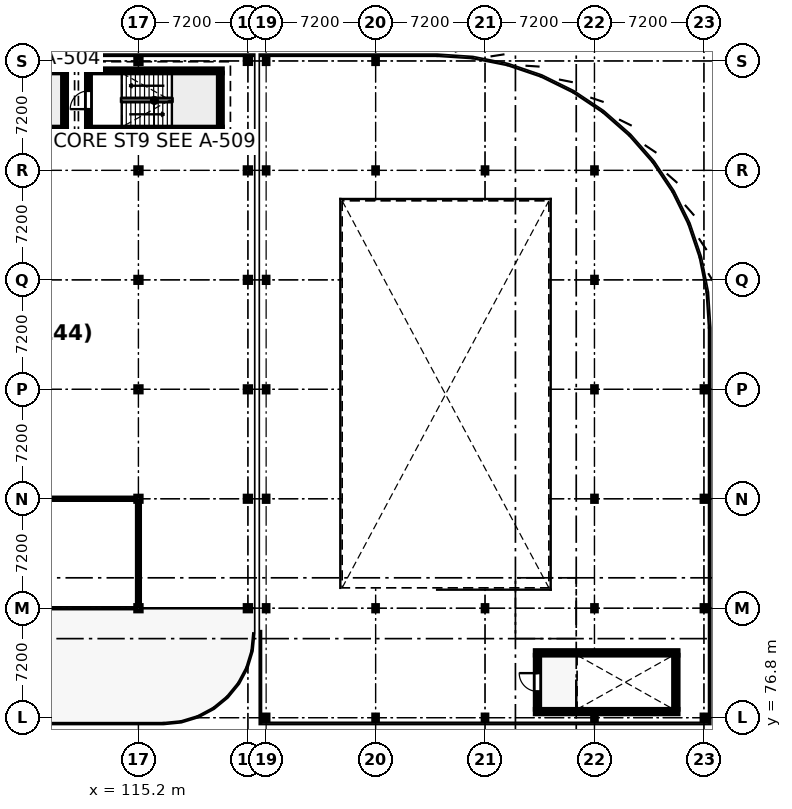
"""IFC4 building model, lengths in metres.
Left out: names, types, materials, properties, quantities, classifications, styles, units other than length and angle.
Written with IfcOpenShell. Run it as: python <this file> out.ifc"""

import sys

from ifc_helpers import new_model, si_unit, direction, frame, frame_2d, origin, origin_2d, place, context, subcontext, project, spatial, rectangle, i_section, extrude, element, fill, save


model = new_model("IFC4")
c1 = context("Model", 3, precision=1e-05, world=origin(), true_north=direction((0.0, 1.0)))
c2 = subcontext(c1, "Body", "Model", "MODEL_VIEW")
j1 = project(units=[si_unit("LENGTHUNIT", "METRE"), si_unit("PLANEANGLEUNIT", "RADIAN")], contexts=[c1])
p1 = place(None, origin())
s1 = spatial("IfcSite", under=j1, at=p1, CompositionType="ELEMENT")
p2 = place(p1, origin())
s2 = spatial("IfcBuilding", under=s1, at=p2, CompositionType="ELEMENT")
p3 = place(p2, frame((0.0, 0.0, 17.1)))
s3 = spatial("IfcBuildingStorey", under=s2, at=p3, CompositionType="ELEMENT", Elevation=17.1)
p4 = place(p3, frame((123.6, 76.8, 0.0), z_axis=(0.0, 0.0, 1.0), x_axis=(1.0, 0.0, 0.0)))
e1 = element("IfcColumn", 1, at=p4, inside=s3, PredefinedType="COLUMN", context=c2, shape_type="SweptSolid", body=[
    extrude(i_section(OverallWidth=0.257, OverallDepth=0.363, WebThickness=0.013, FlangeThickness=0.022, FilletRadius=0.015, at=origin_2d()), origin(), (0.0, 0.0, 1.0), 4.944),
])
for number, where, z_axis, x_axis in (
    (2, (123.6, 84.0, 0.0), (0.0, 0.0, 1.0), (1.0, 0.0, 0.0)),
    (3, (123.6, 91.2, 0.0), (0.0, 0.0, 1.0), (1.0, 0.0, 0.0)),
    (4, (123.6, 98.4, 0.0), (0.0, 0.0, 1.0), (1.0, 0.0, 0.0)),
    (5, (123.6, 105.6, 0.0), (0.0, 0.0, 1.0), (1.0, 0.0, 0.0)),
    (6, (123.6, 112.8, 0.0), (0.0, 0.0, 1.0), (1.0, 0.0, 0.0)),
):
    element("IfcColumn", number, at=place(p3, frame(where, z_axis=z_axis, x_axis=x_axis)), inside=s3, PredefinedType="COLUMN", context=c2, shape_type="SweptSolid", body=[
        extrude(i_section(OverallWidth=0.257, OverallDepth=0.363, WebThickness=0.013, FlangeThickness=0.022, FilletRadius=0.015, at=origin_2d()), origin(), (0.0, 0.0, 1.0), 4.15),
    ])
for number, where, z_axis, x_axis in (
    (7, (123.6, 120.0, 0.0), (0.0, 0.0, 1.0), (1.0, 0.0, 0.0)),
    (8, (130.8, 76.8, 0.0), (0.0, 0.0, 1.0), (1.0, 0.0, 0.0)),
):
    element("IfcColumn", number, at=place(p3, frame(where, z_axis=z_axis, x_axis=x_axis)), inside=s3, PredefinedType="COLUMN", context=c2, shape_type="SweptSolid", body=[
        extrude(i_section(OverallWidth=0.257, OverallDepth=0.363, WebThickness=0.013, FlangeThickness=0.022, FilletRadius=0.015, at=origin_2d()), origin(), (0.0, 0.0, 1.0), 4.944),
    ])
for number, where, z_axis, x_axis in (
    (9, (130.8, 84.0, 0.0), (0.0, 0.0, 1.0), (1.0, 0.0, 0.0)),
    (10, (130.8, 112.8, 0.0), (0.0, 0.0, 1.0), (1.0, 0.0, 0.0)),
):
    element("IfcColumn", number, at=place(p3, frame(where, z_axis=z_axis, x_axis=x_axis)), inside=s3, PredefinedType="COLUMN", context=c2, shape_type="SweptSolid", body=[
        extrude(i_section(OverallWidth=0.257, OverallDepth=0.363, WebThickness=0.013, FlangeThickness=0.022, FilletRadius=0.015, at=origin_2d()), origin(), (0.0, 0.0, 1.0), 4.15),
    ])
for number, where, z_axis, x_axis in (
    (11, (130.8, 120.0, 0.0), (0.0, 0.0, 1.0), (1.0, 0.0, 0.0)),
    (12, (138.0, 76.8, 0.0), (0.0, 0.0, 1.0), (1.0, 0.0, 0.0)),
):
    element("IfcColumn", number, at=place(p3, frame(where, z_axis=z_axis, x_axis=x_axis)), inside=s3, PredefinedType="COLUMN", context=c2, shape_type="SweptSolid", body=[
        extrude(i_section(OverallWidth=0.257, OverallDepth=0.363, WebThickness=0.013, FlangeThickness=0.022, FilletRadius=0.015, at=origin_2d()), origin(), (0.0, 0.0, 1.0), 4.944),
    ])
p5 = place(p3, frame((138.0, 84.0, 0.0), z_axis=(0.0, 0.0, 1.0), x_axis=(1.0, 0.0, 0.0)))
e13 = element("IfcColumn", 13, at=p5, inside=s3, PredefinedType="COLUMN", context=c2, shape_type="SweptSolid", body=[
    extrude(i_section(OverallWidth=0.257, OverallDepth=0.363, WebThickness=0.013, FlangeThickness=0.022, FilletRadius=0.015, at=origin_2d()), origin(), (0.0, 0.0, 1.0), 4.15),
])
p6 = place(p3, frame((138.0, 112.8, 0.0), z_axis=(0.0, 0.0, 1.0), x_axis=(1.0, 0.0, 0.0)))
e14 = element("IfcColumn", 14, at=p6, inside=s3, PredefinedType="COLUMN", context=c2, shape_type="SweptSolid", body=[
    extrude(i_section(OverallWidth=0.257, OverallDepth=0.363, WebThickness=0.013, FlangeThickness=0.022, FilletRadius=0.015, at=origin_2d()), origin(), (0.0, 0.0, 1.0), 6.096),
])
p7 = place(p3, frame((145.2, 76.8, 0.0), z_axis=(0.0, 0.0, 1.0), x_axis=(1.0, 0.0, 0.0)))
e15 = element("IfcColumn", 15, at=p7, inside=s3, PredefinedType="COLUMN", context=c2, shape_type="SweptSolid", body=[
    extrude(i_section(OverallWidth=0.257, OverallDepth=0.363, WebThickness=0.013, FlangeThickness=0.022, FilletRadius=0.015, at=origin_2d()), origin(), (0.0, 0.0, 1.0), 4.944),
])
for number, where, z_axis, x_axis in (
    (16, (145.2, 84.0, 0.0), (0.0, 0.0, 1.0), (1.0, 0.0, 0.0)),
    (17, (145.2, 91.2, 0.0), (0.0, 0.0, 1.0), (1.0, 0.0, 0.0)),
    (18, (145.2, 98.4, 0.0), (0.0, 0.0, 1.0), (1.0, 0.0, 0.0)),
    (19, (145.2, 105.6, 0.0), (0.0, 0.0, 1.0), (1.0, 0.0, 0.0)),
):
    element("IfcColumn", number, at=place(p3, frame(where, z_axis=z_axis, x_axis=x_axis)), inside=s3, PredefinedType="COLUMN", context=c2, shape_type="SweptSolid", body=[
        extrude(i_section(OverallWidth=0.257, OverallDepth=0.363, WebThickness=0.013, FlangeThickness=0.022, FilletRadius=0.015, at=origin_2d()), origin(), (0.0, 0.0, 1.0), 4.15),
    ])
p8 = place(p3, frame((145.2, 112.8, 0.0), z_axis=(0.0, 0.0, 1.0), x_axis=(1.0, 0.0, 0.0)))
e20 = element("IfcColumn", 20, at=p8, inside=s3, PredefinedType="COLUMN", context=c2, shape_type="SweptSolid", body=[
    extrude(i_section(OverallWidth=0.257, OverallDepth=0.363, WebThickness=0.013, FlangeThickness=0.022, FilletRadius=0.015, at=origin_2d()), origin(), (0.0, 0.0, 1.0), 6.096),
])
p9 = place(p3, frame((152.4, 76.8, 0.0), z_axis=(0.0, 0.0, 1.0), x_axis=(1.0, 0.0, 0.0)))
e21 = element("IfcColumn", 21, at=p9, inside=s3, PredefinedType="COLUMN", context=c2, shape_type="SweptSolid", body=[
    extrude(i_section(OverallWidth=0.257, OverallDepth=0.363, WebThickness=0.013, FlangeThickness=0.022, FilletRadius=0.015, at=origin_2d()), origin(), (0.0, 0.0, 1.0), 4.944),
])
for number, where, z_axis, x_axis in (
    (22, (152.4, 84.0, 0.0), (0.0, 0.0, 1.0), (1.0, 0.0, 0.0)),
    (23, (152.4, 91.2, 0.0), (0.0, 0.0, 1.0), (1.0, 0.0, 0.0)),
):
    element("IfcColumn", number, at=place(p3, frame(where, z_axis=z_axis, x_axis=x_axis)), inside=s3, PredefinedType="COLUMN", context=c2, shape_type="SweptSolid", body=[
        extrude(i_section(OverallWidth=0.257, OverallDepth=0.363, WebThickness=0.013, FlangeThickness=0.022, FilletRadius=0.015, at=origin_2d()), origin(), (0.0, 0.0, 1.0), 4.15),
    ])
p10 = place(p3, frame((152.4, 98.4, 0.0), z_axis=(0.0, 0.0, 1.0), x_axis=(1.0, 0.0, 0.0)))
e24 = element("IfcColumn", 24, at=p10, inside=s3, PredefinedType="COLUMN", context=c2, shape_type="SweptSolid", body=[
    extrude(i_section(OverallWidth=0.257, OverallDepth=0.363, WebThickness=0.013, FlangeThickness=0.022, FilletRadius=0.015, at=origin_2d()), origin(), (0.0, 0.0, 1.0), 8.4),
])
p11 = place(p3, frame((115.2, 84.0, 0.0), z_axis=(0.0, 0.0, 1.0), x_axis=(1.0, 0.0, 0.0)))
e25 = element("IfcColumn", 25, at=p11, inside=s3, PredefinedType="COLUMN", context=c2, shape_type="SweptSolid", body=[
    extrude(i_section(OverallWidth=0.371, OverallDepth=0.363, WebThickness=0.013, FlangeThickness=0.022, FilletRadius=0.015, at=origin_2d()), origin(), (0.0, 0.0, 1.0), 3.9),
])
for number, where, z_axis, x_axis in (
    (26, (115.2, 91.2, 0.0), (0.0, 0.0, 1.0), (1.0, 0.0, 0.0)),
    (27, (115.2, 98.4, 0.0), (0.0, 0.0, 1.0), (1.0, 0.0, 0.0)),
    (28, (115.2, 105.6, 0.0), (0.0, 0.0, 1.0), (1.0, 0.0, 0.0)),
):
    element("IfcColumn", number, at=place(p3, frame(where, z_axis=z_axis, x_axis=x_axis)), inside=s3, PredefinedType="COLUMN", context=c2, shape_type="SweptSolid", body=[
        extrude(i_section(OverallWidth=0.368, OverallDepth=0.356, WebThickness=0.011, FlangeThickness=0.018, FilletRadius=0.015, at=origin_2d()), origin(), (0.0, 0.0, 1.0), 3.9),
    ])
p12 = place(p3, frame((115.2, 112.8, 0.0), z_axis=(0.0, 0.0, 1.0), x_axis=(1.0, 0.0, 0.0)))
e29 = element("IfcColumn", 29, at=p12, inside=s3, PredefinedType="COLUMN", context=c2, shape_type="SweptSolid", body=[
    extrude(i_section(OverallWidth=0.371, OverallDepth=0.363, WebThickness=0.013, FlangeThickness=0.022, FilletRadius=0.015, at=origin_2d()), origin(), (0.0, 0.0, 1.0), 3.9),
])
p13 = place(p3, frame((115.2, 120.0, 0.0), z_axis=(0.0, 0.0, 1.0), x_axis=(1.0, 0.0, 0.0)))
e30 = element("IfcColumn", 30, at=p13, inside=s3, PredefinedType="COLUMN", context=c2, shape_type="SweptSolid", body=[
    extrude(i_section(OverallWidth=0.368, OverallDepth=0.356, WebThickness=0.011, FlangeThickness=0.018, FilletRadius=0.015, at=origin_2d()), origin(), (0.0, 0.0, 1.0), 3.9),
])
p14 = place(p3, frame((122.4, 84.0, 0.0), z_axis=(0.0, 0.0, 1.0), x_axis=(1.0, 0.0, 0.0)))
e31 = element("IfcColumn", 31, at=p14, inside=s3, PredefinedType="COLUMN", context=c2, shape_type="SweptSolid", body=[
    extrude(i_section(OverallWidth=0.371, OverallDepth=0.363, WebThickness=0.013, FlangeThickness=0.022, FilletRadius=0.015, at=origin_2d()), origin(), (0.0, 0.0, 1.0), 3.9),
])
for number, where, z_axis, x_axis in (
    (32, (122.4, 91.2, 0.0), (0.0, 0.0, 1.0), (1.0, 0.0, 0.0)),
    (33, (122.4, 98.4, 0.0), (0.0, 0.0, 1.0), (1.0, 0.0, 0.0)),
    (34, (122.4, 105.6, 0.0), (0.0, 0.0, 1.0), (1.0, 0.0, 0.0)),
):
    element("IfcColumn", number, at=place(p3, frame(where, z_axis=z_axis, x_axis=x_axis)), inside=s3, PredefinedType="COLUMN", context=c2, shape_type="SweptSolid", body=[
        extrude(i_section(OverallWidth=0.368, OverallDepth=0.356, WebThickness=0.011, FlangeThickness=0.018, FilletRadius=0.015, at=origin_2d()), origin(), (0.0, 0.0, 1.0), 3.9),
    ])
p15 = place(p3, frame((122.4, 112.8, 0.0), z_axis=(0.0, 0.0, 1.0), x_axis=(1.0, 0.0, 0.0)))
e35 = element("IfcColumn", 35, at=p15, inside=s3, PredefinedType="COLUMN", context=c2, shape_type="SweptSolid", body=[
    extrude(i_section(OverallWidth=0.371, OverallDepth=0.363, WebThickness=0.013, FlangeThickness=0.022, FilletRadius=0.015, at=origin_2d()), origin(), (0.0, 0.0, 1.0), 3.9),
])
p16 = place(p3, frame((122.4, 120.0, 0.0), z_axis=(0.0, 0.0, 1.0), x_axis=(1.0, 0.0, 0.0)))
e36 = element("IfcColumn", 36, at=p16, inside=s3, PredefinedType="COLUMN", context=c2, shape_type="SweptSolid", body=[
    extrude(i_section(OverallWidth=0.368, OverallDepth=0.356, WebThickness=0.011, FlangeThickness=0.018, FilletRadius=0.015, at=origin_2d()), origin(), (0.0, 0.0, 1.0), 3.9),
])
for number, where, z_axis, x_axis in (
    (37, (150.7, 77.2, 0.0), (0.0, 0.0, 1.0), (-1.0, 0.0, 0.0)),
    (38, (141.3, 81.06, 0.0), (0.0, 0.0, 1.0), (1.0, 0.0, 0.0)),
):
    element("IfcWall", number, at=place(p3, frame(where, z_axis=z_axis, x_axis=x_axis)), inside=s3, PredefinedType="SOLIDWALL", context=c2, shape_type="SweptSolid", body=[
        extrude(rectangle(XDim=9.4, YDim=0.3, at=frame_2d((4.7, 0.0))), origin(), (0.0, 0.0, 1.0), 3.4),
    ])
p17 = place(p3, frame((141.45, 77.35, 0.0), z_axis=(0.0, 0.0, 1.0), x_axis=(0.0, 1.0, 0.0)))
e39 = element("IfcWall", 39, at=p17, inside=s3, PredefinedType="SOLIDWALL", context=c2, shape_type="SweptSolid", body=[
    extrude(rectangle(XDim=3.56, YDim=0.3, at=frame_2d((1.78, 0.0))), origin(), (0.0, 0.0, 1.0), 3.4),
])
p18 = place(p17, frame((1.18, 0.0, 0.0)))
e40 = element("IfcOpeningElement", 40, at=p18, cuts=e39, PredefinedType="OPENING", context=c2, shape_type="SweptSolid", body=[
    extrude(rectangle(XDim=1.2, YDim=2.2, at=frame_2d((0.6, 1.1))), frame((0.0, 0.16, 0.0), z_axis=(0.0, -1.0, 0.0), x_axis=(1.0, 0.0, 0.0)), (0.0, 0.0, 1.0), 0.32),
])
p19 = place(p3, frame((150.55, 80.91, 0.0), z_axis=(0.0, 0.0, 1.0), x_axis=(0.0, -1.0, 0.0)))
e41 = element("IfcWall", 41, at=p19, inside=s3, PredefinedType="SOLIDWALL", context=c2, shape_type="SweptSolid", body=[
    extrude(rectangle(XDim=3.56, YDim=0.3, at=frame_2d((1.78, 0.0))), origin(), (0.0, 0.0, 1.0), 3.4),
])
for number, where, z_axis, x_axis in (
    (42, (110.475, 115.512, 0.0), (0.0, 0.0, 1.0), (-1.0, 0.0, 0.0)),
    (43, (101.575, 119.348, 0.0), (0.0, 0.0, 1.0), (1.0, 0.0, 0.0)),
):
    element("IfcWall", number, at=place(p3, frame(where, z_axis=z_axis, x_axis=x_axis)), inside=s3, PredefinedType="SOLIDWALL", context=c2, shape_type="SweptSolid", body=[
        extrude(rectangle(XDim=8.9, YDim=0.275, at=frame_2d((4.45, 0.0))), origin(), (0.0, 0.0, 1.0), 3.64),
    ])
p20 = place(p3, frame((110.338, 119.21, 0.0), z_axis=(0.0, 0.0, 1.0), x_axis=(0.0, -1.0, 0.0)))
e44 = element("IfcWall", 44, at=p20, inside=s3, PredefinedType="SOLIDWALL", context=c2, shape_type="SweptSolid", body=[
    extrude(rectangle(XDim=3.56, YDim=0.275, at=frame_2d((1.78, 0.0))), origin(), (0.0, 0.0, 1.0), 3.64),
])
for number, where, z_axis, x_axis in (
    (45, (120.725, 115.512, 0.0), (0.0, 0.0, 1.0), (-1.0, 0.0, 0.0)),
    (46, (111.775, 119.348, 0.0), (0.0, 0.0, 1.0), (1.0, 0.0, 0.0)),
):
    element("IfcWall", number, at=place(p3, frame(where, z_axis=z_axis, x_axis=x_axis)), inside=s3, PredefinedType="SOLIDWALL", context=c2, shape_type="SweptSolid", body=[
        extrude(rectangle(XDim=8.95, YDim=0.275, at=frame_2d((4.475, 0.0))), origin(), (0.0, 0.0, 1.0), 3.64),
    ])
p21 = place(p3, frame((111.912, 115.65, 0.0), z_axis=(0.0, 0.0, 1.0), x_axis=(0.0, 1.0, 0.0)))
e47 = element("IfcWall", 47, at=p21, inside=s3, PredefinedType="SOLIDWALL", context=c2, shape_type="SweptSolid", body=[
    extrude(rectangle(XDim=3.56, YDim=0.275, at=frame_2d((1.78, 0.0))), origin(), (0.0, 0.0, 1.0), 3.64),
])
p22 = place(p21, frame((1.18, 0.0, 0.0)))
e48 = element("IfcOpeningElement", 48, at=p22, cuts=e47, PredefinedType="OPENING", context=c2, shape_type="SweptSolid", body=[
    extrude(rectangle(XDim=1.2, YDim=2.2, at=frame_2d((0.6, 1.1))), frame((0.0, 0.147, 0.0), z_axis=(0.0, -1.0, 0.0), x_axis=(1.0, 0.0, 0.0)), (0.0, 0.0, 1.0), 0.295),
])
p23 = place(p3, frame((120.588, 119.21, 0.0), z_axis=(0.0, 0.0, 1.0), x_axis=(0.0, -1.0, 0.0)))
e49 = element("IfcWall", 49, at=p23, inside=s3, PredefinedType="SOLIDWALL", context=c2, shape_type="SweptSolid", body=[
    extrude(rectangle(XDim=3.56, YDim=0.275, at=frame_2d((1.78, 0.0))), origin(), (0.0, 0.0, 1.0), 3.64),
])
p24 = place(p3, frame((79.282, 91.2, 0.0), z_axis=(0.0, 0.0, 1.0), x_axis=(1.0, 0.0, 0.0)))
e50 = element("IfcWall", 50, at=p24, inside=s3, PredefinedType="PARTITIONING", context=c2, shape_type="SweptSolid", body=[
    extrude(rectangle(XDim=35.998, YDim=0.11, at=frame_2d((17.999, 0.0))), origin(), (0.0, 0.0, 1.0), 2.863),
])
p25 = place(p24, frame((17.269, 0.0, 0.0)))
e51 = element("IfcOpeningElement", 51, at=p25, cuts=e50, PredefinedType="OPENING", context=c2, shape_type="SweptSolid", body=[
    extrude(rectangle(XDim=1.46, YDim=2.1, at=frame_2d((0.73, 1.05))), frame((0.0, 0.065, 0.0), z_axis=(0.0, -1.0, 0.0), x_axis=(1.0, 0.0, 0.0)), (0.0, 0.0, 1.0), 0.13),
])
p26 = place(p24, frame((22.229, 0.0, 0.95)))
e52 = element("IfcOpeningElement", 52, at=p26, cuts=e50, PredefinedType="OPENING", context=c2, shape_type="SweptSolid", body=[
    extrude(rectangle(XDim=1.25, YDim=1.15, at=frame_2d((0.625, 0.575))), frame((0.0, 0.065, 0.0), z_axis=(0.0, -1.0, 0.0), x_axis=(1.0, 0.0, 0.0)), (0.0, 0.0, 1.0), 0.13),
])
p27 = place(p3, frame((115.2, 91.143, 0.0), z_axis=(0.0, 0.0, 1.0), x_axis=(0.0, -1.0, 0.0)))
e53 = element("IfcWall", 53, at=p27, inside=s3, PredefinedType="PARTITIONING", context=c2, shape_type="SweptSolid", body=[
    extrude(rectangle(XDim=7.021, YDim=0.155, at=frame_2d((3.51, 0.0))), origin(), (0.0, 0.0, 1.0), 2.863),
])
p28 = place(p18, origin())
e54 = element("IfcDoor", 54, at=p28, inside=s3, OperationType="SINGLE_SWING_RIGHT", PredefinedType="DOOR", context=c2, shape_type="SweptSolid", body=[
    extrude(rectangle(XDim=1.2, YDim=2.2, at=frame_2d((0.6, 1.1))), frame((0.0, 0.025, 0.0), z_axis=(0.0, -1.0, 0.0), x_axis=(1.0, 0.0, 0.0)), (0.0, 0.0, 1.0), 0.05),
])
fill(e40, e54)
p29 = place(p22, origin())
e55 = element("IfcDoor", 55, at=p29, inside=s3, OperationType="SINGLE_SWING_LEFT", PredefinedType="DOOR", context=c2, shape_type="SweptSolid", body=[
    extrude(rectangle(XDim=1.2, YDim=2.2, at=frame_2d((0.6, 1.1))), frame((0.0, 0.025, 0.0), z_axis=(0.0, -1.0, 0.0), x_axis=(1.0, 0.0, 0.0)), (0.0, 0.0, 1.0), 0.05),
])
fill(e48, e55)
save(model, sys.argv[1])
